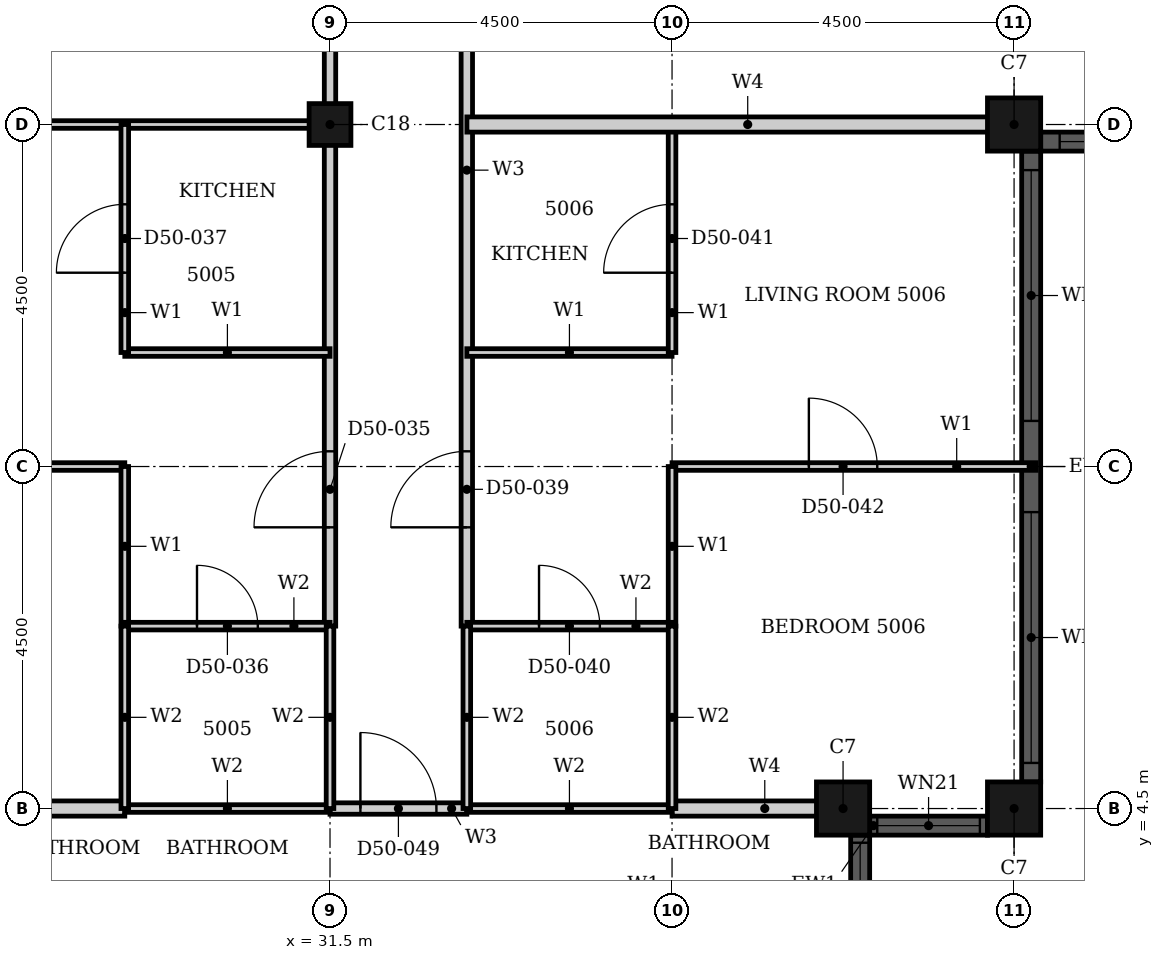
"""IFC4 building model, lengths in metres.
Left out: names, types, materials, properties, quantities, classifications, styles, units other than length and angle.
Written with IfcOpenShell. Run it as: python <this file> out.ifc"""

import sys

from ifc_helpers import new_model, si_unit, direction, frame, frame_2d, origin, origin_2d, place, context, subcontext, project, spatial, rectangle, hollow_rectangle, extrude, element, fill, save


model = new_model("IFC4")
c1 = context("Model", 3, precision=1e-05, world=origin(), true_north=direction((0.0, 1.0)))
c2 = subcontext(c1, "Body", "Model", "MODEL_VIEW")
j1 = project(units=[si_unit("LENGTHUNIT", "METRE"), si_unit("PLANEANGLEUNIT", "RADIAN")], contexts=[c1])
p1 = place(None, origin())
s1 = spatial("IfcSite", under=j1, at=p1, CompositionType="ELEMENT")
p2 = place(p1, origin())
s2 = spatial("IfcBuilding", under=s1, at=p2, CompositionType="ELEMENT")
p3 = place(p2, frame((0.0, 0.0, 199.8)))
s3 = spatial("IfcBuildingStorey", under=s2, at=p3, CompositionType="ELEMENT", Elevation=199.8)
for number, where, z_axis, x_axis in (
    (1, (40.5, 13.5, 0.0), (0.0, 0.0, 1.0), (1.0, 0.0, 0.0)),
    (2, (38.25, 4.5, 0.0), (0.0, 0.0, 1.0), (1.0, 0.0, 0.0)),
    (3, (40.5, 4.5, 0.0), (0.0, 0.0, 1.0), (1.0, 0.0, 0.0)),
):
    element("IfcColumn", number, at=place(p3, frame(where, z_axis=z_axis, x_axis=x_axis)), inside=s3, PredefinedType="COLUMN", context=c2, shape_type="SweptSolid", body=[
        extrude(hollow_rectangle(XDim=0.7, YDim=0.7, WallThickness=0.022, at=origin_2d()), origin(), (0.0, 0.0, 1.0), 3.7),
    ])
p4 = place(p3, frame((31.5, 13.5, 0.0), z_axis=(0.0, 0.0, 1.0), x_axis=(1.0, 0.0, 0.0)))
e4 = element("IfcColumn", 4, at=p4, inside=s3, PredefinedType="COLUMN", context=c2, shape_type="SweptSolid", body=[
    extrude(hollow_rectangle(XDim=0.55, YDim=0.55, WallThickness=0.018, at=origin_2d()), origin(), (0.0, 0.0, 1.0), 3.7),
])
p5 = place(p3, frame((40.85, 13.275, 0.0), z_axis=(0.0, 0.0, 1.0), x_axis=(1.0, 0.0, 0.0)))
e5 = element("IfcWall", 5, at=p5, inside=s3, PredefinedType="SOLIDWALL", context=c2, shape_type="SweptSolid", body=[
    extrude(rectangle(XDim=3.8, YDim=0.25, at=frame_2d((1.9, 0.0))), origin(), (0.0, 0.0, 1.0), 3.7),
])
p6 = place(p5, frame((0.25, 0.0, 0.45)))
e6 = element("IfcOpeningElement", 6, at=p6, cuts=e5, PredefinedType="OPENING", context=c2, shape_type="SweptSolid", body=[
    extrude(rectangle(XDim=3.3, YDim=2.3, at=frame_2d((1.65, 1.15))), frame((0.0, 0.135, 0.0), z_axis=(0.0, -1.0, 0.0), x_axis=(1.0, 0.0, 0.0)), (0.0, 0.0, 1.0), 0.27),
])
p7 = place(p3, frame((38.475, 2.6, 0.0), z_axis=(0.0, 0.0, 1.0), x_axis=(0.0, 1.0, 0.0)))
e7 = element("IfcWall", 7, at=p7, inside=s3, PredefinedType="SOLIDWALL", context=c2, shape_type="SweptSolid", body=[
    extrude(rectangle(XDim=1.55, YDim=0.25, at=frame_2d((0.775, 0.0))), origin(), (0.0, 0.0, 1.0), 3.7),
])
p8 = place(p7, frame((0.1, 0.0, 0.9)))
e8 = element("IfcOpeningElement", 8, at=p8, cuts=e7, PredefinedType="OPENING", context=c2, shape_type="SweptSolid", body=[
    extrude(rectangle(XDim=1.35, YDim=1.85, at=frame_2d((0.675, 0.925))), frame((0.0, 0.135, 0.0), z_axis=(0.0, -1.0, 0.0), x_axis=(1.0, 0.0, 0.0)), (0.0, 0.0, 1.0), 0.27),
])
p9 = place(p3, frame((38.6, 4.275, 0.0), z_axis=(0.0, 0.0, 1.0), x_axis=(1.0, 0.0, 0.0)))
e9 = element("IfcWall", 9, at=p9, inside=s3, PredefinedType="SOLIDWALL", context=c2, shape_type="SweptSolid", body=[
    extrude(rectangle(XDim=1.55, YDim=0.25, at=frame_2d((0.775, 0.0))), origin(), (0.0, 0.0, 1.0), 3.7),
])
p10 = place(p9, frame((0.1, 0.0, 0.9)))
e10 = element("IfcOpeningElement", 10, at=p10, cuts=e9, PredefinedType="OPENING", context=c2, shape_type="SweptSolid", body=[
    extrude(rectangle(XDim=1.35, YDim=1.85, at=frame_2d((0.675, 0.925))), frame((0.0, 0.135, 0.0), z_axis=(0.0, -1.0, 0.0), x_axis=(1.0, 0.0, 0.0)), (0.0, 0.0, 1.0), 0.27),
])
p11 = place(p3, frame((40.725, 4.85, 0.0), z_axis=(0.0, 0.0, 1.0), x_axis=(0.0, 1.0, 0.0)))
e11 = element("IfcWall", 11, at=p11, inside=s3, PredefinedType="SOLIDWALL", context=c2, shape_type="SweptSolid", body=[
    extrude(rectangle(XDim=8.3, YDim=0.25, at=frame_2d((4.15, 0.0))), origin(), (0.0, 0.0, 1.0), 3.7),
])
p12 = place(p11, frame((0.25, 0.0, 0.45)))
e12 = element("IfcOpeningElement", 12, at=p12, cuts=e11, PredefinedType="OPENING", context=c2, shape_type="SweptSolid", body=[
    extrude(rectangle(XDim=3.3, YDim=2.3, at=frame_2d((1.65, 1.15))), frame((0.0, 0.135, 0.0), z_axis=(0.0, -1.0, 0.0), x_axis=(1.0, 0.0, 0.0)), (0.0, 0.0, 1.0), 0.27),
])
p13 = place(p11, frame((4.75, 0.0, 0.45)))
e13 = element("IfcOpeningElement", 13, at=p13, cuts=e11, PredefinedType="OPENING", context=c2, shape_type="SweptSolid", body=[
    extrude(rectangle(XDim=3.3, YDim=2.3, at=frame_2d((1.65, 1.15))), frame((0.0, 0.135, 0.0), z_axis=(0.0, -1.0, 0.0), x_axis=(1.0, 0.0, 0.0)), (0.0, 0.0, 1.0), 0.27),
])
p14 = place(p3, frame((31.5, 4.5, 0.0), z_axis=(0.0, 0.0, 1.0), x_axis=(1.0, 0.0, 0.0)))
e14 = element("IfcWall", 14, at=p14, inside=s3, PredefinedType="PARTITIONING", context=c2, shape_type="SweptSolid", body=[
    extrude(rectangle(XDim=1.8, YDim=0.15, at=frame_2d((0.9, 0.0))), origin(), (0.0, 0.0, 1.0), 3.4),
])
p15 = place(p14, frame((0.4, 0.0, 0.0)))
e15 = element("IfcOpeningElement", 15, at=p15, cuts=e14, PredefinedType="OPENING", context=c2, shape_type="SweptSolid", body=[
    extrude(rectangle(XDim=1.0, YDim=2.2, at=frame_2d((0.5, 1.1))), frame((0.0, 0.085, 0.0), z_axis=(0.0, -1.0, 0.0), x_axis=(1.0, 0.0, 0.0)), (0.0, 0.0, 1.0), 0.17),
])
p16 = place(p3, frame((31.5, 6.9, 0.0), z_axis=(0.0, 0.0, 1.0), x_axis=(0.0, 1.0, 0.0)))
e16 = element("IfcWall", 16, at=p16, inside=s3, PredefinedType="PARTITIONING", context=c2, shape_type="SweptSolid", body=[
    extrude(rectangle(XDim=13.8, YDim=0.15, at=frame_2d((6.9, 0.0))), origin(), (0.0, 0.0, 1.0), 2.68),
])
p17 = place(p16, frame((1.3, 0.0, 0.0)))
e17 = element("IfcOpeningElement", 17, at=p17, cuts=e16, PredefinedType="OPENING", context=c2, shape_type="SweptSolid", body=[
    extrude(rectangle(XDim=1.0, YDim=2.2, at=frame_2d((0.5, 1.1))), frame((0.0, 0.085, 0.0), z_axis=(0.0, -1.0, 0.0), x_axis=(1.0, 0.0, 0.0)), (0.0, 0.0, 1.0), 0.17),
])
p18 = place(p3, frame((33.3, 6.9, 0.0), z_axis=(0.0, 0.0, 1.0), x_axis=(0.0, 1.0, 0.0)))
e18 = element("IfcWall", 18, at=p18, inside=s3, PredefinedType="PARTITIONING", context=c2, shape_type="SweptSolid", body=[
    extrude(rectangle(XDim=13.799, YDim=0.15, at=frame_2d((6.899, 0.0))), origin(), (0.0, 0.0, 1.0), 3.4),
])
p19 = place(p18, frame((9.699, 0.0, 0.0)))
e19 = element("IfcOpeningElement", 19, at=p19, cuts=e18, PredefinedType="OPENING", context=c2, shape_type="SweptSolid", body=[
    extrude(rectangle(XDim=1.0, YDim=2.2, at=frame_2d((0.5, 1.1))), frame((0.0, 0.085, 0.0), z_axis=(0.0, -1.0, 0.0), x_axis=(1.0, 0.0, 0.0)), (0.0, 0.0, 1.0), 0.17),
])
p20 = place(p18, frame((1.3, 0.0, 0.0)))
e20 = element("IfcOpeningElement", 20, at=p20, cuts=e18, PredefinedType="OPENING", context=c2, shape_type="SweptSolid", body=[
    extrude(rectangle(XDim=1.0, YDim=2.2, at=frame_2d((0.5, 1.1))), frame((0.0, 0.085, 0.0), z_axis=(0.0, -1.0, 0.0), x_axis=(1.0, 0.0, 0.0)), (0.0, 0.0, 1.0), 0.17),
])
for number, where, z_axis, x_axis in (
    (21, (33.3, 10.5, 0.0), (0.0, 0.0, 1.0), (1.0, 0.0, 0.0)),
    (22, (28.8, 10.5, 0.0), (0.0, 0.0, 1.0), (1.0, 0.0, 0.0)),
):
    element("IfcWall", number, at=place(p3, frame(where, z_axis=z_axis, x_axis=x_axis)), inside=s3, PredefinedType="PARTITIONING", context=c2, shape_type="SweptSolid", body=[
        extrude(rectangle(XDim=2.7, YDim=0.1, at=frame_2d((1.35, 0.0))), origin(), (0.0, 0.0, 1.0), 3.4),
    ])
p21 = place(p3, frame((22.31, 13.5, 0.0), z_axis=(0.0, 0.0, 1.0), x_axis=(1.0, 0.0, 0.0)))
e23 = element("IfcWall", 23, at=p21, inside=s3, PredefinedType="PARTITIONING", context=c2, shape_type="SweptSolid", body=[
    extrude(rectangle(XDim=9.19, YDim=0.1, at=frame_2d((4.595, 0.0))), origin(), (0.0, 0.0, 1.0), 2.48),
])
p22 = place(p3, frame((36.0, 9.0, 0.0), z_axis=(0.0, 0.0, 1.0), x_axis=(1.0, 0.0, 0.0)))
e24 = element("IfcWall", 24, at=p22, inside=s3, PredefinedType="PARTITIONING", context=c2, shape_type="SweptSolid", body=[
    extrude(rectangle(XDim=4.79, YDim=0.1, at=frame_2d((2.395, 0.0))), origin(), (0.0, 0.0, 1.0), 3.4),
])
p23 = place(p22, frame((1.8, 0.0, 0.0)))
e25 = element("IfcOpeningElement", 25, at=p23, cuts=e24, PredefinedType="OPENING", context=c2, shape_type="SweptSolid", body=[
    extrude(rectangle(XDim=0.9, YDim=2.1, at=frame_2d((0.45, 1.05))), frame((0.0, 0.06, 0.0), z_axis=(0.0, -1.0, 0.0), x_axis=(1.0, 0.0, 0.0)), (0.0, 0.0, 1.0), 0.12),
])
p24 = place(p3, frame((22.21, 9.0, 0.0), z_axis=(0.0, 0.0, 1.0), x_axis=(1.0, 0.0, 0.0)))
e26 = element("IfcWall", 26, at=p24, inside=s3, PredefinedType="PARTITIONING", context=c2, shape_type="SweptSolid", body=[
    extrude(rectangle(XDim=6.59, YDim=0.1, at=frame_2d((3.295, 0.0))), origin(), (0.0, 0.0, 1.0), 3.4),
])
p25 = place(p24, frame((2.7, 0.0, 0.0)))
e27 = element("IfcOpeningElement", 27, at=p25, cuts=e26, PredefinedType="OPENING", context=c2, shape_type="SweptSolid", body=[
    extrude(rectangle(XDim=0.9, YDim=2.1, at=frame_2d((0.45, 1.05))), frame((0.0, 0.06, 0.0), z_axis=(0.0, -1.0, 0.0), x_axis=(1.0, 0.0, 0.0)), (0.0, 0.0, 1.0), 0.12),
])
p26 = place(p3, frame((28.8, 6.9, 0.0), z_axis=(0.0, 0.0, 1.0), x_axis=(0.0, 1.0, 0.0)))
e28 = element("IfcWall", 28, at=p26, inside=s3, PredefinedType="PARTITIONING", context=c2, shape_type="SweptSolid", body=[
    extrude(rectangle(XDim=2.1, YDim=0.1, at=frame_2d((1.05, 0.0))), origin(), (0.0, 0.0, 1.0), 3.4),
])
p27 = place(p3, frame((28.8, 10.5, 0.0), z_axis=(0.0, 0.0, 1.0), x_axis=(0.0, 1.0, 0.0)))
e29 = element("IfcWall", 29, at=p27, inside=s3, PredefinedType="PARTITIONING", context=c2, shape_type="SweptSolid", body=[
    extrude(rectangle(XDim=3.0, YDim=0.1, at=frame_2d((1.5, 0.0))), origin(), (0.0, 0.0, 1.0), 3.4),
])
p28 = place(p27, frame((1.05, 0.0, 0.0)))
e30 = element("IfcOpeningElement", 30, at=p28, cuts=e29, PredefinedType="OPENING", context=c2, shape_type="SweptSolid", body=[
    extrude(rectangle(XDim=0.9, YDim=2.1, at=frame_2d((0.45, 1.05))), frame((0.0, 0.06, 0.0), z_axis=(0.0, -1.0, 0.0), x_axis=(1.0, 0.0, 0.0)), (0.0, 0.0, 1.0), 0.12),
])
p29 = place(p3, frame((36.0, 6.9, 0.0), z_axis=(0.0, 0.0, 1.0), x_axis=(0.0, 1.0, 0.0)))
e31 = element("IfcWall", 31, at=p29, inside=s3, PredefinedType="PARTITIONING", context=c2, shape_type="SweptSolid", body=[
    extrude(rectangle(XDim=2.1, YDim=0.1, at=frame_2d((1.05, 0.0))), origin(), (0.0, 0.0, 1.0), 2.68),
])
p30 = place(p3, frame((36.0, 10.5, 0.0), z_axis=(0.0, 0.0, 1.0), x_axis=(0.0, 1.0, 0.0)))
e32 = element("IfcWall", 32, at=p30, inside=s3, PredefinedType="PARTITIONING", context=c2, shape_type="SweptSolid", body=[
    extrude(rectangle(XDim=3.0, YDim=0.1, at=frame_2d((1.5, 0.0))), origin(), (0.0, 0.0, 1.0), 2.68),
])
p31 = place(p30, frame((1.05, 0.0, 0.0)))
e33 = element("IfcOpeningElement", 33, at=p31, cuts=e32, PredefinedType="OPENING", context=c2, shape_type="SweptSolid", body=[
    extrude(rectangle(XDim=0.9, YDim=2.1, at=frame_2d((0.45, 1.05))), frame((0.0, 0.06, 0.0), z_axis=(0.0, -1.0, 0.0), x_axis=(1.0, 0.0, 0.0)), (0.0, 0.0, 1.0), 0.12),
])
p32 = place(p3, frame((33.301, 13.5, 0.0), z_axis=(0.0, 0.0, 1.0), x_axis=(1.0, 0.0, 0.0)))
e34 = element("IfcWall", 34, at=p32, inside=s3, PredefinedType="PARTITIONING", context=c2, shape_type="SweptSolid", body=[
    extrude(rectangle(XDim=7.389, YDim=0.2, at=frame_2d((3.694, 0.0))), origin(), (0.0, 0.0, 1.0), 2.48),
])
p33 = place(p3, frame((36.0, 4.5, 0.0), z_axis=(0.0, 0.0, 1.0), x_axis=(1.0, 0.0, 0.0)))
e35 = element("IfcWall", 35, at=p33, inside=s3, PredefinedType="PARTITIONING", context=c2, shape_type="SweptSolid", body=[
    extrude(rectangle(XDim=2.44, YDim=0.2, at=frame_2d((1.22, 0.0))), origin(), (0.0, 0.0, 1.0), 3.4),
])
p34 = place(p3, frame((24.56, 4.5, 0.0), z_axis=(0.0, 0.0, 1.0), x_axis=(1.0, 0.0, 0.0)))
e36 = element("IfcWall", 36, at=p34, inside=s3, PredefinedType="PARTITIONING", context=c2, shape_type="SweptSolid", body=[
    extrude(rectangle(XDim=4.24, YDim=0.2, at=frame_2d((2.12, 0.0))), origin(), (0.0, 0.0, 1.0), 3.4),
])
for number, where, z_axis, x_axis in (
    (37, (33.3, 4.5, 0.0), (0.0, 0.0, 1.0), (1.0, 0.0, 0.0)),
    (38, (28.8, 4.5, 0.0), (0.0, 0.0, 1.0), (1.0, 0.0, 0.0)),
):
    element("IfcWall", number, at=place(p3, frame(where, z_axis=z_axis, x_axis=x_axis)), inside=s3, PredefinedType="PARTITIONING", context=c2, shape_type="SweptSolid", body=[
        extrude(rectangle(XDim=2.7, YDim=0.1, at=frame_2d((1.35, 0.0))), origin(), (0.0, 0.0, 1.0), 3.4),
    ])
p35 = place(p3, frame((33.3, 6.9, 0.0), z_axis=(0.0, 0.0, 1.0), x_axis=(1.0, 0.0, 0.0)))
e39 = element("IfcWall", 39, at=p35, inside=s3, PredefinedType="PARTITIONING", context=c2, shape_type="SweptSolid", body=[
    extrude(rectangle(XDim=2.7, YDim=0.1, at=frame_2d((1.35, 0.0))), origin(), (0.0, 0.0, 1.0), 3.4),
])
p36 = place(p35, frame((0.95, 0.0, 0.0)))
e40 = element("IfcOpeningElement", 40, at=p36, cuts=e39, PredefinedType="OPENING", context=c2, shape_type="SweptSolid", body=[
    extrude(rectangle(XDim=0.8, YDim=2.1, at=frame_2d((0.4, 1.05))), frame((0.0, 0.06, 0.0), z_axis=(0.0, -1.0, 0.0), x_axis=(1.0, 0.0, 0.0)), (0.0, 0.0, 1.0), 0.12),
])
p37 = place(p3, frame((28.8, 6.9, 0.0), z_axis=(0.0, 0.0, 1.0), x_axis=(1.0, 0.0, 0.0)))
e41 = element("IfcWall", 41, at=p37, inside=s3, PredefinedType="PARTITIONING", context=c2, shape_type="SweptSolid", body=[
    extrude(rectangle(XDim=2.7, YDim=0.1, at=frame_2d((1.35, 0.0))), origin(), (0.0, 0.0, 1.0), 3.4),
])
p38 = place(p37, frame((0.95, 0.0, 0.0)))
e42 = element("IfcOpeningElement", 42, at=p38, cuts=e41, PredefinedType="OPENING", context=c2, shape_type="SweptSolid", body=[
    extrude(rectangle(XDim=0.8, YDim=2.1, at=frame_2d((0.4, 1.05))), frame((0.0, 0.06, 0.0), z_axis=(0.0, -1.0, 0.0), x_axis=(1.0, 0.0, 0.0)), (0.0, 0.0, 1.0), 0.12),
])
p39 = place(p3, frame((28.8, 4.5, 0.0), z_axis=(0.0, 0.0, 1.0), x_axis=(0.0, 1.0, 0.0)))
e43 = element("IfcWall", 43, at=p39, inside=s3, PredefinedType="PARTITIONING", context=c2, shape_type="SweptSolid", body=[
    extrude(rectangle(XDim=2.4, YDim=0.1, at=frame_2d((1.2, 0.0))), origin(), (0.0, 0.0, 1.0), 3.4),
])
p40 = place(p3, frame((31.5, 4.5, 0.0), z_axis=(0.0, 0.0, 1.0), x_axis=(0.0, 1.0, 0.0)))
e44 = element("IfcWall", 44, at=p40, inside=s3, PredefinedType="PARTITIONING", context=c2, shape_type="SweptSolid", body=[
    extrude(rectangle(XDim=2.4, YDim=0.1, at=frame_2d((1.2, 0.0))), origin(), (0.0, 0.0, 1.0), 2.68),
])
p41 = place(p3, frame((33.3, 4.5, 0.0), z_axis=(0.0, 0.0, 1.0), x_axis=(0.0, 1.0, 0.0)))
e45 = element("IfcWall", 45, at=p41, inside=s3, PredefinedType="PARTITIONING", context=c2, shape_type="SweptSolid", body=[
    extrude(rectangle(XDim=2.4, YDim=0.1, at=frame_2d((1.2, 0.0))), origin(), (0.0, 0.0, 1.0), 3.4),
])
p42 = place(p3, frame((36.0, 4.5, 0.0), z_axis=(0.0, 0.0, 1.0), x_axis=(0.0, 1.0, 0.0)))
e46 = element("IfcWall", 46, at=p42, inside=s3, PredefinedType="PARTITIONING", context=c2, shape_type="SweptSolid", body=[
    extrude(rectangle(XDim=2.4, YDim=0.1, at=frame_2d((1.2, 0.0))), origin(), (0.0, 0.0, 1.0), 2.68),
])
p43 = place(p6, origin())
e47 = element("IfcWindow", 47, at=p43, inside=s3, PartitioningType="SINGLE_PANEL", PredefinedType="WINDOW", context=c2, shape_type="SweptSolid", body=[
    extrude(rectangle(XDim=3.3, YDim=2.3, at=frame_2d((1.65, 1.15))), frame((0.0, 0.03, 0.0), z_axis=(0.0, -1.0, 0.0), x_axis=(1.0, 0.0, 0.0)), (0.0, 0.0, 1.0), 0.06),
])
fill(e6, e47)
p44 = place(p8, origin())
e48 = element("IfcWindow", 48, at=p44, inside=s3, PartitioningType="SINGLE_PANEL", PredefinedType="WINDOW", context=c2, shape_type="SweptSolid", body=[
    extrude(rectangle(XDim=1.35, YDim=1.85, at=frame_2d((0.675, 0.925))), frame((0.0, 0.03, 0.0), z_axis=(0.0, -1.0, 0.0), x_axis=(1.0, 0.0, 0.0)), (0.0, 0.0, 1.0), 0.06),
])
fill(e8, e48)
p45 = place(p10, origin())
e49 = element("IfcWindow", 49, at=p45, inside=s3, PartitioningType="SINGLE_PANEL", PredefinedType="WINDOW", context=c2, shape_type="SweptSolid", body=[
    extrude(rectangle(XDim=1.35, YDim=1.85, at=frame_2d((0.675, 0.925))), frame((0.0, 0.03, 0.0), z_axis=(0.0, -1.0, 0.0), x_axis=(1.0, 0.0, 0.0)), (0.0, 0.0, 1.0), 0.06),
])
fill(e10, e49)
p46 = place(p12, origin())
e50 = element("IfcWindow", 50, at=p46, inside=s3, PartitioningType="SINGLE_PANEL", PredefinedType="WINDOW", context=c2, shape_type="SweptSolid", body=[
    extrude(rectangle(XDim=3.3, YDim=2.3, at=frame_2d((1.65, 1.15))), frame((0.0, 0.03, 0.0), z_axis=(0.0, -1.0, 0.0), x_axis=(1.0, 0.0, 0.0)), (0.0, 0.0, 1.0), 0.06),
])
fill(e12, e50)
p47 = place(p13, origin())
e51 = element("IfcWindow", 51, at=p47, inside=s3, PartitioningType="SINGLE_PANEL", PredefinedType="WINDOW", context=c2, shape_type="SweptSolid", body=[
    extrude(rectangle(XDim=3.3, YDim=2.3, at=frame_2d((1.65, 1.15))), frame((0.0, 0.03, 0.0), z_axis=(0.0, -1.0, 0.0), x_axis=(1.0, 0.0, 0.0)), (0.0, 0.0, 1.0), 0.06),
])
fill(e13, e51)
p48 = place(p17, origin())
e52 = element("IfcDoor", 52, at=p48, inside=s3, OperationType="SINGLE_SWING_LEFT", PredefinedType="DOOR", context=c2, shape_type="SweptSolid", body=[
    extrude(rectangle(XDim=1.0, YDim=2.2, at=frame_2d((0.5, 1.1))), frame((0.0, 0.025, 0.0), z_axis=(0.0, -1.0, 0.0), x_axis=(1.0, 0.0, 0.0)), (0.0, 0.0, 1.0), 0.05),
])
fill(e17, e52)
p49 = place(p38, origin())
e53 = element("IfcDoor", 53, at=p49, inside=s3, OperationType="SINGLE_SWING_LEFT", PredefinedType="DOOR", context=c2, shape_type="SweptSolid", body=[
    extrude(rectangle(XDim=0.8, YDim=2.1, at=frame_2d((0.4, 1.05))), frame((0.0, 0.025, 0.0), z_axis=(0.0, -1.0, 0.0), x_axis=(1.0, 0.0, 0.0)), (0.0, 0.0, 1.0), 0.05),
])
fill(e42, e53)
p50 = place(p28, origin())
e54 = element("IfcDoor", 54, at=p50, inside=s3, OperationType="SINGLE_SWING_LEFT", PredefinedType="DOOR", context=c2, shape_type="SweptSolid", body=[
    extrude(rectangle(XDim=0.9, YDim=2.1, at=frame_2d((0.45, 1.05))), frame((0.0, 0.025, 0.0), z_axis=(0.0, -1.0, 0.0), x_axis=(1.0, 0.0, 0.0)), (0.0, 0.0, 1.0), 0.05),
])
fill(e30, e54)
p51 = place(p20, origin())
e55 = element("IfcDoor", 55, at=p51, inside=s3, OperationType="SINGLE_SWING_RIGHT", PredefinedType="DOOR", context=c2, shape_type="SweptSolid", body=[
    extrude(rectangle(XDim=1.0, YDim=2.2, at=frame_2d((0.5, 1.1))), frame((0.0, 0.025, 0.0), z_axis=(0.0, -1.0, 0.0), x_axis=(1.0, 0.0, 0.0)), (0.0, 0.0, 1.0), 0.05),
])
fill(e20, e55)
p52 = place(p36, origin())
e56 = element("IfcDoor", 56, at=p52, inside=s3, OperationType="SINGLE_SWING_RIGHT", PredefinedType="DOOR", context=c2, shape_type="SweptSolid", body=[
    extrude(rectangle(XDim=0.8, YDim=2.1, at=frame_2d((0.4, 1.05))), frame((0.0, 0.025, 0.0), z_axis=(0.0, -1.0, 0.0), x_axis=(1.0, 0.0, 0.0)), (0.0, 0.0, 1.0), 0.05),
])
fill(e40, e56)
p53 = place(p31, origin())
e57 = element("IfcDoor", 57, at=p53, inside=s3, OperationType="SINGLE_SWING_LEFT", PredefinedType="DOOR", context=c2, shape_type="SweptSolid", body=[
    extrude(rectangle(XDim=0.9, YDim=2.1, at=frame_2d((0.45, 1.05))), frame((0.0, 0.025, 0.0), z_axis=(0.0, -1.0, 0.0), x_axis=(1.0, 0.0, 0.0)), (0.0, 0.0, 1.0), 0.05),
])
fill(e33, e57)
p54 = place(p23, origin())
e58 = element("IfcDoor", 58, at=p54, inside=s3, OperationType="SINGLE_SWING_LEFT", PredefinedType="DOOR", context=c2, shape_type="SweptSolid", body=[
    extrude(rectangle(XDim=0.9, YDim=2.1, at=frame_2d((0.45, 1.05))), frame((0.0, 0.025, 0.0), z_axis=(0.0, -1.0, 0.0), x_axis=(1.0, 0.0, 0.0)), (0.0, 0.0, 1.0), 0.05),
])
fill(e25, e58)
p55 = place(p15, origin())
e59 = element("IfcDoor", 59, at=p55, inside=s3, OperationType="SINGLE_SWING_RIGHT", PredefinedType="DOOR", context=c2, shape_type="SweptSolid", body=[
    extrude(rectangle(XDim=1.0, YDim=2.2, at=frame_2d((0.5, 1.1))), frame((0.0, 0.025, 0.0), z_axis=(0.0, -1.0, 0.0), x_axis=(1.0, 0.0, 0.0)), (0.0, 0.0, 1.0), 0.05),
])
fill(e15, e59)
save(model, sys.argv[1])
